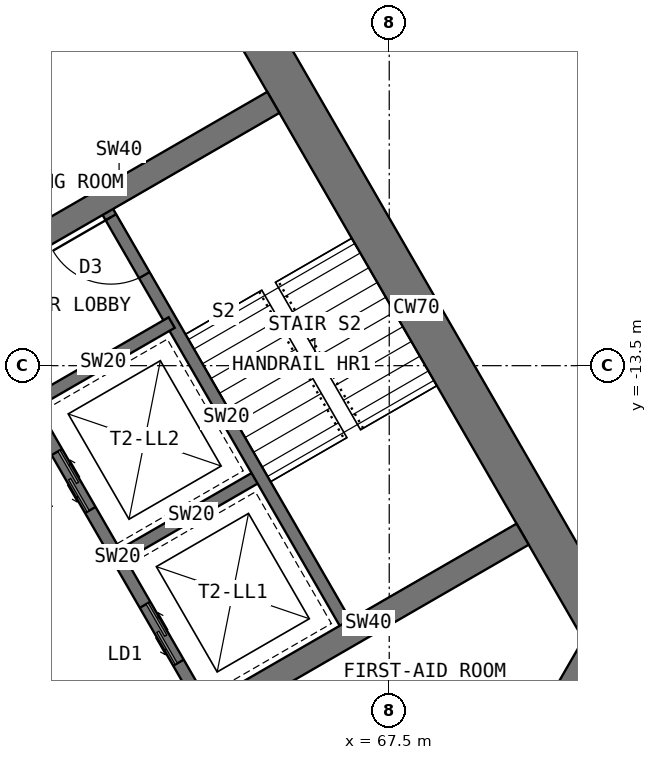
"""IFC4 building model, lengths in metres.
Left out: names, types, materials, properties, quantities, classifications, styles, units other than length and angle.
Written with IfcOpenShell. Run it as: python <this file> out.ifc"""

import sys

from ifc_helpers import new_model, si_unit, direction, frame, frame_2d, origin, place, context, subcontext, project, spatial, rectangle, extrude, element, fill, save


model = new_model("IFC4")
c1 = context("Model", 3, precision=1e-05, world=origin(), true_north=direction((0.0, 1.0)))
c2 = subcontext(c1, "Body", "Model", "MODEL_VIEW")
j1 = project(units=[si_unit("LENGTHUNIT", "METRE"), si_unit("PLANEANGLEUNIT", "RADIAN")], contexts=[c1])
p1 = place(None, origin())
s1 = spatial("IfcSite", under=j1, at=p1, CompositionType="ELEMENT")
p2 = place(p1, origin())
s2 = spatial("IfcBuilding", under=s1, at=p2, CompositionType="ELEMENT")
p3 = place(p2, frame((0.0, 0.0, 36.5)))
s3 = spatial("IfcBuildingStorey", under=s2, at=p3, CompositionType="ELEMENT", Elevation=36.5)
p4 = place(p3, frame((68.822, -21.939, 0.0), z_axis=(0.0, 0.0, 1.0), x_axis=(0.500024481964, 0.866011268655, 0.0)))
e1 = element("IfcWall", 1, at=p4, inside=s3, PredefinedType="SHEAR", context=c2, shape_type="SweptSolid", body=[
    extrude(rectangle(XDim=4.548, YDim=0.7, at=frame_2d((2.274, 0.0))), origin(), (0.0, 0.0, 1.0), 4.0),
])
p5 = place(p3, frame((71.096, -18.0, 0.0), z_axis=(0.0, 0.0, 1.0), x_axis=(-0.500005998175, 0.866021940709, 0.0)))
e2 = element("IfcWall", 2, at=p5, inside=s3, PredefinedType="SHEAR", context=c2, shape_type="SweptSolid", body=[
    extrude(rectangle(XDim=12.596, YDim=0.7, at=frame_2d((6.298, 0.0))), origin(), (0.0, 0.0, 1.0), 4.0),
])
p6 = place(p3, frame((64.484, -19.164, 0.0), z_axis=(0.0, 0.0, 1.0), x_axis=(-0.49999894854, 0.866026010844, 0.0)))
e3 = element("IfcWall", 3, at=p6, inside=s3, PredefinedType="SHEAR", context=c2, shape_type="SweptSolid", body=[
    extrude(rectangle(XDim=8.0, YDim=0.2, at=frame_2d((4.0, 0.0))), origin(), (0.0, 0.0, 1.0), 4.0),
])
p7 = place(p6, frame((6.3, 0.0, 0.0)))
e4 = element("IfcOpeningElement", 4, at=p7, cuts=e3, PredefinedType="OPENING", context=c2, shape_type="SweptSolid", body=[
    extrude(rectangle(XDim=1.2, YDim=2.1, at=frame_2d((0.6, 1.05))), frame((0.0, 0.11, 0.0), z_axis=(0.0, -1.0, 0.0), x_axis=(1.0, 0.0, 0.0)), (0.0, 0.0, 1.0), 0.22),
])
p8 = place(p6, frame((0.9, 0.0, 0.0)))
e5 = element("IfcOpeningElement", 5, at=p8, cuts=e3, PredefinedType="OPENING", context=c2, shape_type="SweptSolid", body=[
    extrude(rectangle(XDim=1.1, YDim=2.2, at=frame_2d((0.55, 1.1))), frame((0.0, 0.11, 0.0), z_axis=(0.0, -1.0, 0.0), x_axis=(1.0, 0.0, 0.0)), (0.0, 0.0, 1.0), 0.22),
])
p9 = place(p6, frame((3.8, 0.0, 0.0)))
e6 = element("IfcOpeningElement", 6, at=p9, cuts=e3, PredefinedType="OPENING", context=c2, shape_type="SweptSolid", body=[
    extrude(rectangle(XDim=1.1, YDim=2.2, at=frame_2d((0.55, 1.1))), frame((0.0, 0.11, 0.0), z_axis=(0.0, -1.0, 0.0), x_axis=(1.0, 0.0, 0.0)), (0.0, 0.0, 1.0), 0.22),
])
p10 = place(p3, frame((63.12, -16.603, 0.0), z_axis=(0.0, 0.0, 1.0), x_axis=(0.866062058628, 0.499936506574, 0.0)))
e7 = element("IfcWall", 7, at=p10, inside=s3, PredefinedType="SHEAR", context=c2, shape_type="SweptSolid", body=[
    extrude(rectangle(XDim=2.6, YDim=0.2, at=frame_2d((1.3, 0.0))), origin(), (0.0, 0.0, 1.0), 4.0),
])
p11 = place(p3, frame((61.67, -14.091, 0.0), z_axis=(0.0, 0.0, 1.0), x_axis=(0.86603858612, 0.49997716683, 0.0)))
e8 = element("IfcWall", 8, at=p11, inside=s3, PredefinedType="SHEAR", context=c2, shape_type="SweptSolid", body=[
    extrude(rectangle(XDim=2.6, YDim=0.2, at=frame_2d((1.3, 0.0))), origin(), (0.0, 0.0, 1.0), 4.0),
])
p12 = place(p3, frame((66.822, -17.814, 0.0), z_axis=(0.0, 0.0, 1.0), x_axis=(-0.49999894854, 0.866026010844, 0.0)))
e9 = element("IfcWall", 9, at=p12, inside=s3, PredefinedType="SHEAR", context=c2, shape_type="SweptSolid", body=[
    extrude(rectangle(XDim=8.0, YDim=0.2, at=frame_2d((4.0, 0.0))), origin(), (0.0, 0.0, 1.0), 4.0),
])
p13 = place(p12, frame((6.7, 0.0, 0.0)))
e10 = element("IfcOpeningElement", 10, at=p13, cuts=e9, PredefinedType="OPENING", context=c2, shape_type="SweptSolid", body=[
    extrude(rectangle(XDim=1.1, YDim=2.1, at=frame_2d((0.55, 1.05))), frame((0.0, 0.11, 0.0), z_axis=(0.0, -1.0, 0.0), x_axis=(1.0, 0.0, 0.0)), (0.0, 0.0, 1.0), 0.22),
])
for number, where, z_axis, x_axis in (
    (11, (60.52, -12.099, 0.0), (0.0, 0.0, 1.0), (0.866, 0.5, 0.0)),
    (12, (64.62, -19.201, 0.0), (0.0, 0.0, 1.0), (0.866, 0.5, 0.0)),
):
    element("IfcWall", number, at=place(p3, frame(where, z_axis=z_axis, x_axis=x_axis)), inside=s3, PredefinedType="SHEAR", context=c2, shape_type="SweptSolid", body=[
        extrude(rectangle(XDim=5.858, YDim=0.4, at=frame_2d((2.929, 0.0))), origin(), (0.0, 0.0, 1.0), 4.0),
    ])
p14 = place(p8, origin())
e13 = element("IfcDoor", 13, at=p14, inside=s3, OperationType="DOUBLE_DOOR_SLIDING", PredefinedType="DOOR", context=c2, shape_type="SweptSolid", body=[
    extrude(rectangle(XDim=1.1, YDim=2.2, at=frame_2d((0.55, 1.1))), frame((0.0, 0.025, 0.0), z_axis=(0.0, -1.0, 0.0), x_axis=(1.0, 0.0, 0.0)), (0.0, 0.0, 1.0), 0.05),
])
fill(e5, e13)
p15 = place(p9, origin())
e14 = element("IfcDoor", 14, at=p15, inside=s3, OperationType="DOUBLE_DOOR_SLIDING", PredefinedType="DOOR", context=c2, shape_type="SweptSolid", body=[
    extrude(rectangle(XDim=1.1, YDim=2.2, at=frame_2d((0.55, 1.1))), frame((0.0, 0.025, 0.0), z_axis=(0.0, -1.0, 0.0), x_axis=(1.0, 0.0, 0.0)), (0.0, 0.0, 1.0), 0.05),
])
fill(e6, e14)
p16 = place(p13, origin())
e15 = element("IfcDoor", 15, at=p16, inside=s3, OperationType="SINGLE_SWING_RIGHT", PredefinedType="DOOR", context=c2, shape_type="SweptSolid", body=[
    extrude(rectangle(XDim=1.1, YDim=2.1, at=frame_2d((0.55, 1.05))), frame((0.0, 0.025, 0.0), z_axis=(0.0, -1.0, 0.0), x_axis=(1.0, 0.0, 0.0)), (0.0, 0.0, 1.0), 0.05),
])
fill(e10, e15)
save(model, sys.argv[1])
